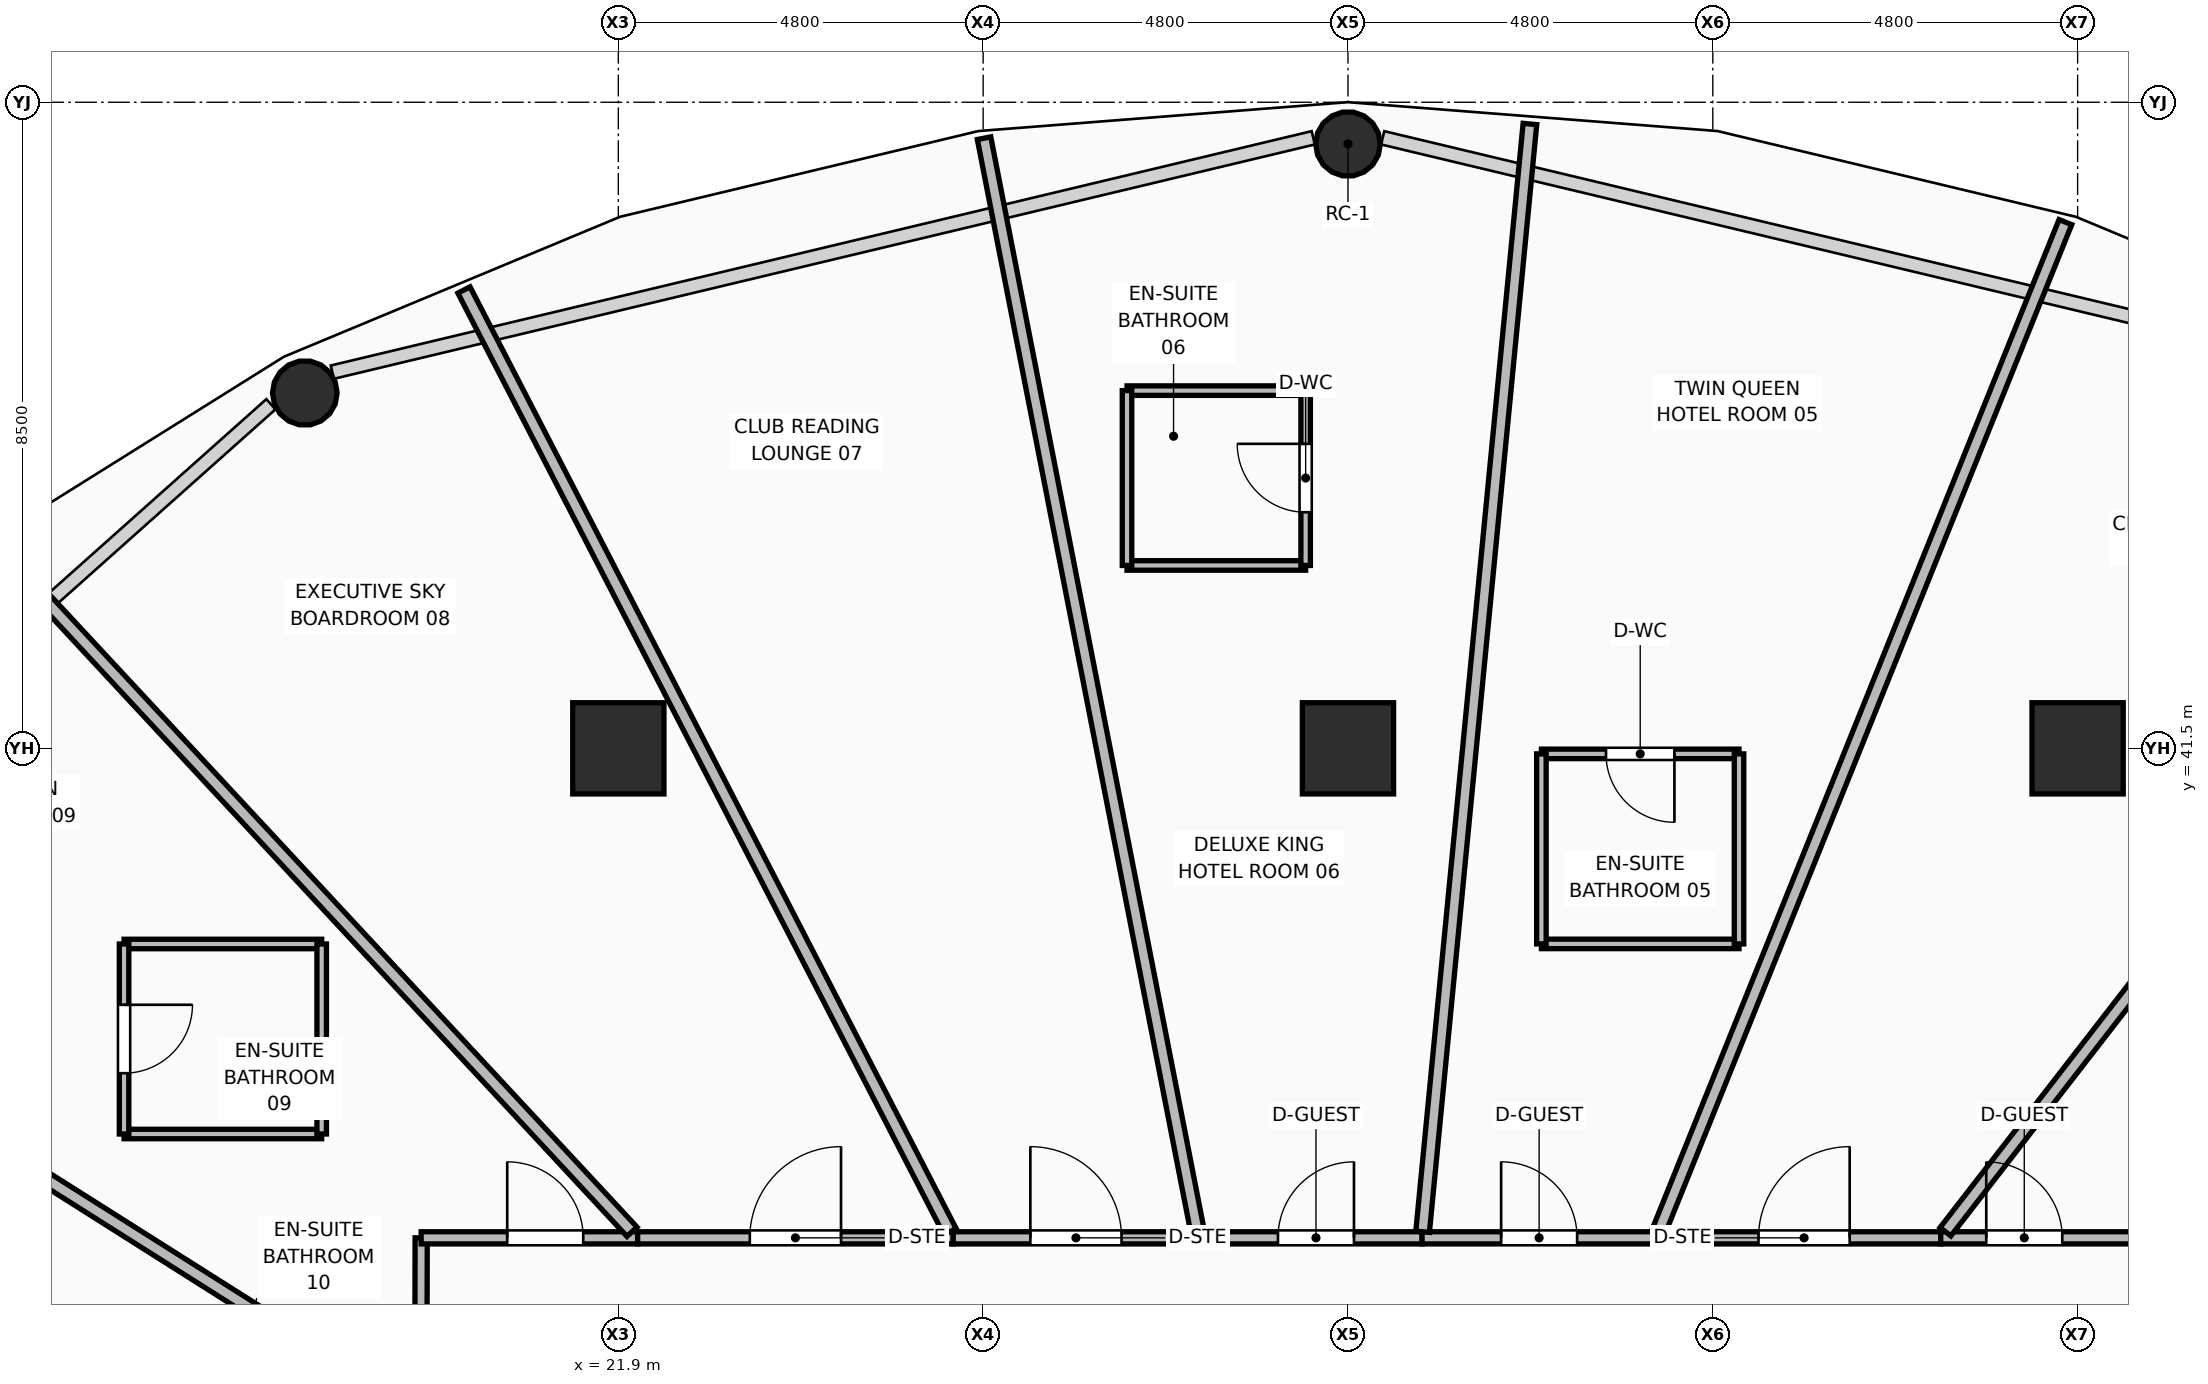
"""IFC4 building model, lengths in metres.
Left out: names, types, materials, properties, quantities, classifications, styles, units other than length and angle.
Written with IfcOpenShell. Run it as: python <this file> out.ifc"""

import sys

from ifc_helpers import new_model, si_unit, direction, frame, frame_2d, origin, origin_2d, place, context, subcontext, project, spatial, rectangle, hollow_rectangle, hollow_circle, extrude, element, fill, save


model = new_model("IFC4")
c1 = context("Model", 3, precision=1e-05, world=origin(), true_north=direction((0.0, 1.0)))
c2 = subcontext(c1, "Body", "Model", "MODEL_VIEW")
j1 = project(units=[si_unit("LENGTHUNIT", "METRE"), si_unit("PLANEANGLEUNIT", "RADIAN")], contexts=[c1])
p1 = place(None, origin())
s1 = spatial("IfcSite", under=j1, at=p1, CompositionType="ELEMENT")
p2 = place(p1, origin())
s2 = spatial("IfcBuilding", under=s1, at=p2, CompositionType="ELEMENT")
p3 = place(p2, frame((0.0, 0.0, 64.5)))
s3 = spatial("IfcBuildingStorey", under=s2, at=p3, CompositionType="ELEMENT", Elevation=64.5)
for number, where, z_axis, x_axis in (
    (1, (21.9, 41.5, 0.0), (0.0, 0.0, 1.0), (1.0, 0.0, 0.0)),
    (2, (31.5, 41.5, 0.0), (0.0, 0.0, 1.0), (1.0, 0.0, 0.0)),
    (3, (41.1, 41.5, 0.0), (0.0, 0.0, 1.0), (1.0, 0.0, 0.0)),
):
    element("IfcColumn", number, at=place(p3, frame(where, z_axis=z_axis, x_axis=x_axis)), inside=s3, PredefinedType="COLUMN", context=c2, shape_type="SweptSolid", body=[
        extrude(hollow_rectangle(XDim=1.2, YDim=1.2, WallThickness=0.045, at=origin_2d()), origin(), (0.0, 0.0, 1.0), 3.75),
    ])
p4 = place(p3, frame((31.5, 49.451, 0.0), z_axis=(0.0, 0.04979113632, 0.998759652141), x_axis=(-1.0, 0.0, 0.0)))
e4 = element("IfcColumn", 4, at=p4, inside=s3, PredefinedType="COLUMN", context=c2, shape_type="SweptSolid", body=[
    extrude(hollow_circle(Radius=0.425, WallThickness=0.04, at=origin_2d()), origin(), (0.0, 0.0, 1.0), 3.574),
])
p5 = place(p3, frame((17.775, 46.175, 0.0), z_axis=(-0.027932729625, 0.043094260131, 0.998680453078), x_axis=(-0.839141746313, -0.543912795946, 0.0)))
e5 = element("IfcColumn", 5, at=p5, inside=s3, PredefinedType="COLUMN", context=c2, shape_type="SweptSolid", body=[
    extrude(hollow_circle(Radius=0.425, WallThickness=0.04, at=origin_2d()), origin(), (0.0, 0.0, 1.0), 3.575),
])
p6 = place(p3, frame((19.301, 32.715, 0.0), z_axis=(0.0, 0.0, 1.0), x_axis=(0.002082244315, 0.999997832127, 0.0)))
e6 = element("IfcWall", 6, at=p6, inside=s3, PredefinedType="PARTITIONING", context=c2, shape_type="SweptSolid", body=[
    extrude(rectangle(XDim=2.345, YDim=0.16, at=frame_2d((1.172, 0.0))), origin(), (0.0, 0.0, 1.0), 2.928),
])
p7 = place(p3, frame((19.306, 35.06, 0.0), z_axis=(0.0, 0.0, 1.0), x_axis=(1.0, 0.0, 0.0)))
e7 = element("IfcWall", 7, at=p7, inside=s3, PredefinedType="PARTITIONING", context=c2, shape_type="SweptSolid", body=[
    extrude(rectangle(XDim=2.848, YDim=0.16, at=frame_2d((1.424, 0.0))), origin(), (0.0, 0.0, 1.0), 2.928),
])
p8 = place(p7, frame((1.132, 0.0, 0.0)))
e8 = element("IfcOpeningElement", 8, at=p8, cuts=e7, PredefinedType="OPENING", context=c2, shape_type="SweptSolid", body=[
    extrude(rectangle(XDim=1.0, YDim=2.1, at=frame_2d((0.5, 1.05))), frame((0.0, 0.09, 0.0), z_axis=(0.0, -1.0, 0.0), x_axis=(1.0, 0.0, 0.0)), (0.0, 0.0, 1.0), 0.18),
])
p9 = place(p3, frame((22.154, 35.06, 0.0), z_axis=(0.0, 0.0, 1.0), x_axis=(1.0, 0.0, 0.0)))
e9 = element("IfcWall", 9, at=p9, inside=s3, PredefinedType="PARTITIONING", context=c2, shape_type="SweptSolid", body=[
    extrude(rectangle(XDim=4.152, YDim=0.16, at=frame_2d((2.076, 0.0))), origin(), (0.0, 0.0, 1.0), 3.55),
])
p10 = place(p9, frame((1.476, 0.0, 0.0)))
e10 = element("IfcOpeningElement", 10, at=p10, cuts=e9, PredefinedType="OPENING", context=c2, shape_type="SweptSolid", body=[
    extrude(rectangle(XDim=1.2, YDim=2.1, at=frame_2d((0.6, 1.05))), frame((0.0, 0.09, 0.0), z_axis=(0.0, -1.0, 0.0), x_axis=(1.0, 0.0, 0.0)), (0.0, 0.0, 1.0), 0.18),
])
p11 = place(p3, frame((26.306, 35.06, 0.0), z_axis=(0.0, 0.0, 1.0), x_axis=(1.0, 0.0, 0.0)))
e11 = element("IfcWall", 11, at=p11, inside=s3, PredefinedType="PARTITIONING", context=c2, shape_type="SweptSolid", body=[
    extrude(rectangle(XDim=3.23, YDim=0.16, at=frame_2d((1.615, 0.0))), origin(), (0.0, 0.0, 1.0), 3.55),
])
p12 = place(p11, frame((1.015, 0.0, 0.0)))
e12 = element("IfcOpeningElement", 12, at=p12, cuts=e11, PredefinedType="OPENING", context=c2, shape_type="SweptSolid", body=[
    extrude(rectangle(XDim=1.2, YDim=2.1, at=frame_2d((0.6, 1.05))), frame((0.0, 0.09, 0.0), z_axis=(0.0, -1.0, 0.0), x_axis=(1.0, 0.0, 0.0)), (0.0, 0.0, 1.0), 0.18),
])
p13 = place(p3, frame((29.536, 35.06, 0.0), z_axis=(0.0, 0.0, 1.0), x_axis=(1.0, 0.0, 0.0)))
e13 = element("IfcWall", 13, at=p13, inside=s3, PredefinedType="PARTITIONING", context=c2, shape_type="SweptSolid", body=[
    extrude(rectangle(XDim=2.939, YDim=0.16, at=frame_2d((1.47, 0.0))), origin(), (0.0, 0.0, 1.0), 2.928),
])
p14 = place(p13, frame((1.043, 0.0, 0.0)))
e14 = element("IfcOpeningElement", 14, at=p14, cuts=e13, PredefinedType="OPENING", context=c2, shape_type="SweptSolid", body=[
    extrude(rectangle(XDim=1.0, YDim=2.1, at=frame_2d((0.5, 1.05))), frame((0.0, 0.09, 0.0), z_axis=(0.0, -1.0, 0.0), x_axis=(1.0, 0.0, 0.0)), (0.0, 0.0, 1.0), 0.18),
])
p15 = place(p3, frame((32.475, 35.06, 0.0), z_axis=(0.0, 0.0, 1.0), x_axis=(1.0, 0.0, 0.0)))
e15 = element("IfcWall", 15, at=p15, inside=s3, PredefinedType="PARTITIONING", context=c2, shape_type="SweptSolid", body=[
    extrude(rectangle(XDim=3.079, YDim=0.16, at=frame_2d((1.54, 0.0))), origin(), (0.0, 0.0, 1.0), 3.55),
])
p16 = place(p15, frame((1.04, 0.0, 0.0)))
e16 = element("IfcOpeningElement", 16, at=p16, cuts=e15, PredefinedType="OPENING", context=c2, shape_type="SweptSolid", body=[
    extrude(rectangle(XDim=1.0, YDim=2.1, at=frame_2d((0.5, 1.05))), frame((0.0, 0.09, 0.0), z_axis=(0.0, -1.0, 0.0), x_axis=(1.0, 0.0, 0.0)), (0.0, 0.0, 1.0), 0.18),
])
p17 = place(p3, frame((35.554, 35.06, 0.0), z_axis=(0.0, 0.0, 1.0), x_axis=(1.0, 0.0, 0.0)))
e17 = element("IfcWall", 17, at=p17, inside=s3, PredefinedType="PARTITIONING", context=c2, shape_type="SweptSolid", body=[
    extrude(rectangle(XDim=3.745, YDim=0.16, at=frame_2d((1.873, 0.0))), origin(), (0.0, 0.0, 1.0), 3.55),
])
p18 = place(p17, frame((1.347, 0.0, 0.0)))
e18 = element("IfcOpeningElement", 18, at=p18, cuts=e17, PredefinedType="OPENING", context=c2, shape_type="SweptSolid", body=[
    extrude(rectangle(XDim=1.2, YDim=2.1, at=frame_2d((0.6, 1.05))), frame((0.0, 0.09, 0.0), z_axis=(0.0, -1.0, 0.0), x_axis=(1.0, 0.0, 0.0)), (0.0, 0.0, 1.0), 0.18),
])
p19 = place(p3, frame((39.299, 35.06, 0.0), z_axis=(0.0, 0.0, 1.0), x_axis=(1.0, 0.0, 0.0)))
e19 = element("IfcWall", 19, at=p19, inside=s3, PredefinedType="PARTITIONING", context=c2, shape_type="SweptSolid", body=[
    extrude(rectangle(XDim=4.395, YDim=0.16, at=frame_2d((2.198, 0.0))), origin(), (0.0, 0.0, 1.0), 2.888),
])
p20 = place(p19, frame((0.599, 0.0, 0.0)))
e20 = element("IfcOpeningElement", 20, at=p20, cuts=e19, PredefinedType="OPENING", context=c2, shape_type="SweptSolid", body=[
    extrude(rectangle(XDim=1.0, YDim=2.1, at=frame_2d((0.5, 1.05))), frame((0.0, 0.09, 0.0), z_axis=(0.0, -1.0, 0.0), x_axis=(1.0, 0.0, 0.0)), (0.0, 0.0, 1.0), 0.18),
])
p21 = place(p3, frame((39.361, 35.14, 0.0), z_axis=(0.0, 0.0, 1.0), x_axis=(0.612637755807, 0.790363827714, 0.0)))
e21 = element("IfcWall", 21, at=p21, inside=s3, PredefinedType="PARTITIONING", context=c2, shape_type="SweptSolid", body=[
    extrude(rectangle(XDim=12.981, YDim=0.18, at=frame_2d((6.491, 0.0))), origin(), (0.0, 0.0, 1.0), 2.735),
])
p22 = place(p3, frame((35.586, 35.14, 0.0), z_axis=(0.0, 0.0, 1.0), x_axis=(0.373781962033, 0.927516600853, 0.0)))
e22 = element("IfcWall", 22, at=p22, inside=s3, PredefinedType="PARTITIONING", context=c2, shape_type="SweptSolid", body=[
    extrude(rectangle(XDim=14.321, YDim=0.18, at=frame_2d((7.161, 0.0))), origin(), (0.0, 0.0, 1.0), 2.735),
])
p23 = place(p3, frame((32.482, 35.14, 0.0), z_axis=(0.0, 0.0, 1.0), x_axis=(0.096439292658, 0.995338868342, 0.0)))
e23 = element("IfcWall", 23, at=p23, inside=s3, PredefinedType="PARTITIONING", context=c2, shape_type="SweptSolid", body=[
    extrude(rectangle(XDim=14.643, YDim=0.18, at=frame_2d((7.321, 0.0))), origin(), (0.0, 0.0, 1.0), 2.735),
])
p24 = place(p3, frame((29.521, 35.14, 0.0), z_axis=(0.0, 0.0, 1.0), x_axis=(-0.19163010074, 0.981467220283, 0.0)))
e24 = element("IfcWall", 24, at=p24, inside=s3, PredefinedType="PARTITIONING", context=c2, shape_type="SweptSolid", body=[
    extrude(rectangle(XDim=14.659, YDim=0.18, at=frame_2d((7.33, 0.0))), origin(), (0.0, 0.0, 1.0), 2.775),
])
p25 = place(p3, frame((26.265, 35.14, 0.0), z_axis=(0.0, 0.0, 1.0), x_axis=(-0.458704466824, 0.888588888134, 0.0)))
e25 = element("IfcWall", 25, at=p25, inside=s3, PredefinedType="PARTITIONING", context=c2, shape_type="SweptSolid", body=[
    extrude(rectangle(XDim=13.944, YDim=0.18, at=frame_2d((6.972, 0.0))), origin(), (0.0, 0.0, 1.0), 2.775),
])
p26 = place(p3, frame((22.08, 35.14, 0.0), z_axis=(0.0, 0.0, 1.0), x_axis=(-0.680639721347, 0.732618297427, 0.0)))
e26 = element("IfcWall", 26, at=p26, inside=s3, PredefinedType="PARTITIONING", context=c2, shape_type="SweptSolid", body=[
    extrude(rectangle(XDim=12.311, YDim=0.18, at=frame_2d((6.155, 0.0))), origin(), (0.0, 0.0, 1.0), 2.775),
])
p27 = place(p3, frame((19.21, 32.773, 0.0), z_axis=(0.0, 0.0, 1.0), x_axis=(-0.845148426003, 0.534531699738, 0.0)))
e27 = element("IfcWall", 27, at=p27, inside=s3, PredefinedType="PARTITIONING", context=c2, shape_type="SweptSolid", body=[
    extrude(rectangle(XDim=12.291, YDim=0.18, at=frame_2d((6.146, 0.0))), origin(), (0.0, 0.0, 1.0), 2.775),
])
p28 = place(p3, frame((34.045, 38.927, 0.0), z_axis=(0.0, 0.0, 1.0), x_axis=(1.0, 0.0, 0.0)))
e28 = element("IfcWall", 28, at=p28, inside=s3, PredefinedType="PARTITIONING", context=c2, shape_type="SweptSolid", body=[
    extrude(rectangle(XDim=2.6, YDim=0.125, at=frame_2d((1.3, 0.0))), origin(), (0.0, 0.0, 1.0), 3.55),
])
p29 = place(p3, frame((34.045, 41.427, 0.0), z_axis=(0.0, 0.0, 1.0), x_axis=(1.0, 0.0, 0.0)))
e29 = element("IfcWall", 29, at=p29, inside=s3, PredefinedType="PARTITIONING", context=c2, shape_type="SweptSolid", body=[
    extrude(rectangle(XDim=2.6, YDim=0.125, at=frame_2d((1.3, 0.0))), origin(), (0.0, 0.0, 1.0), 3.55),
])
p30 = place(p29, frame((0.85, 0.0, 0.0)))
e30 = element("IfcOpeningElement", 30, at=p30, cuts=e29, PredefinedType="OPENING", context=c2, shape_type="SweptSolid", body=[
    extrude(rectangle(XDim=0.9, YDim=2.1, at=frame_2d((0.45, 1.05))), frame((0.0, 0.073, 0.0), z_axis=(0.0, -1.0, 0.0), x_axis=(1.0, 0.0, 0.0)), (0.0, 0.0, 1.0), 0.145),
])
for number, where, z_axis, x_axis in (
    (31, (34.045, 38.927, 0.0), (0.0, 0.0, 1.0), (0.0, 1.0, 0.0)),
    (32, (36.645, 38.927, 0.0), (0.0, 0.0, 1.0), (0.0, 1.0, 0.0)),
):
    element("IfcWall", number, at=place(p3, frame(where, z_axis=z_axis, x_axis=x_axis)), inside=s3, PredefinedType="PARTITIONING", context=c2, shape_type="SweptSolid", body=[
        extrude(rectangle(XDim=2.5, YDim=0.125, at=frame_2d((1.25, 0.0))), origin(), (0.0, 0.0, 1.0), 3.55),
    ])
for number, where, z_axis, x_axis in (
    (33, (28.593, 43.906, 0.0), (0.0, 0.0, 1.0), (1.0, 0.0, 0.0)),
    (34, (28.593, 46.206, 0.0), (0.0, 0.0, 1.0), (1.0, 0.0, 0.0)),
):
    element("IfcWall", number, at=place(p3, frame(where, z_axis=z_axis, x_axis=x_axis)), inside=s3, PredefinedType="PARTITIONING", context=c2, shape_type="SweptSolid", body=[
        extrude(rectangle(XDim=2.35, YDim=0.125, at=frame_2d((1.175, 0.0))), origin(), (0.0, 0.0, 1.0), 3.55),
    ])
p31 = place(p3, frame((28.593, 43.906, 0.0), z_axis=(0.0, 0.0, 1.0), x_axis=(0.0, 1.0, 0.0)))
e35 = element("IfcWall", 35, at=p31, inside=s3, PredefinedType="PARTITIONING", context=c2, shape_type="SweptSolid", body=[
    extrude(rectangle(XDim=2.3, YDim=0.125, at=frame_2d((1.15, 0.0))), origin(), (0.0, 0.0, 1.0), 3.55),
])
p32 = place(p3, frame((30.943, 43.906, 0.0), z_axis=(0.0, 0.0, 1.0), x_axis=(0.0, 1.0, 0.0)))
e36 = element("IfcWall", 36, at=p32, inside=s3, PredefinedType="PARTITIONING", context=c2, shape_type="SweptSolid", body=[
    extrude(rectangle(XDim=2.3, YDim=0.125, at=frame_2d((1.15, 0.0))), origin(), (0.0, 0.0, 1.0), 3.55),
])
p33 = place(p32, frame((0.7, 0.0, 0.0)))
e37 = element("IfcOpeningElement", 37, at=p33, cuts=e36, PredefinedType="OPENING", context=c2, shape_type="SweptSolid", body=[
    extrude(rectangle(XDim=0.9, YDim=2.1, at=frame_2d((0.45, 1.05))), frame((0.0, 0.073, 0.0), z_axis=(0.0, -1.0, 0.0), x_axis=(1.0, 0.0, 0.0)), (0.0, 0.0, 1.0), 0.145),
])
for number, where, z_axis, x_axis in (
    (38, (15.397, 36.426, 0.0), (0.0, 0.0, 1.0), (1.0, 0.0, 0.0)),
    (39, (15.397, 38.926, 0.0), (0.0, 0.0, 1.0), (1.0, 0.0, 0.0)),
):
    element("IfcWall", number, at=place(p3, frame(where, z_axis=z_axis, x_axis=x_axis)), inside=s3, PredefinedType="PARTITIONING", context=c2, shape_type="SweptSolid", body=[
        extrude(rectangle(XDim=2.6, YDim=0.125, at=frame_2d((1.3, 0.0))), origin(), (0.0, 0.0, 1.0), 3.55),
    ])
p34 = place(p3, frame((15.397, 36.426, 0.0), z_axis=(0.0, 0.0, 1.0), x_axis=(0.0, 1.0, 0.0)))
e40 = element("IfcWall", 40, at=p34, inside=s3, PredefinedType="PARTITIONING", context=c2, shape_type="SweptSolid", body=[
    extrude(rectangle(XDim=2.5, YDim=0.125, at=frame_2d((1.25, 0.0))), origin(), (0.0, 0.0, 1.0), 3.55),
])
p35 = place(p34, frame((0.8, 0.0, 0.0)))
e41 = element("IfcOpeningElement", 41, at=p35, cuts=e40, PredefinedType="OPENING", context=c2, shape_type="SweptSolid", body=[
    extrude(rectangle(XDim=0.9, YDim=2.1, at=frame_2d((0.45, 1.05))), frame((0.0, 0.073, 0.0), z_axis=(0.0, -1.0, 0.0), x_axis=(1.0, 0.0, 0.0)), (0.0, 0.0, 1.0), 0.145),
])
p36 = place(p3, frame((17.997, 36.426, 0.0), z_axis=(0.0, 0.0, 1.0), x_axis=(0.0, 1.0, 0.0)))
e42 = element("IfcWall", 42, at=p36, inside=s3, PredefinedType="PARTITIONING", context=c2, shape_type="SweptSolid", body=[
    extrude(rectangle(XDim=2.5, YDim=0.125, at=frame_2d((1.25, 0.0))), origin(), (0.0, 0.0, 1.0), 3.55),
])
p37 = place(p20, origin())
e43 = element("IfcDoor", 43, at=p37, inside=s3, OperationType="SINGLE_SWING_LEFT", PredefinedType="DOOR", context=c2, shape_type="SweptSolid", body=[
    extrude(rectangle(XDim=1.0, YDim=2.1, at=frame_2d((0.5, 1.05))), frame((0.0, 0.025, 0.0), z_axis=(0.0, -1.0, 0.0), x_axis=(1.0, 0.0, 0.0)), (0.0, 0.0, 1.0), 0.05),
])
fill(e20, e43)
p38 = place(p18, origin())
e44 = element("IfcDoor", 44, at=p38, inside=s3, OperationType="SINGLE_SWING_RIGHT", PredefinedType="DOOR", context=c2, shape_type="SweptSolid", body=[
    extrude(rectangle(XDim=1.2, YDim=2.1, at=frame_2d((0.6, 1.05))), frame((0.0, 0.025, 0.0), z_axis=(0.0, -1.0, 0.0), x_axis=(1.0, 0.0, 0.0)), (0.0, 0.0, 1.0), 0.05),
])
fill(e18, e44)
p39 = place(p30, frame((0.9, 0.0, 0.0), z_axis=(0.0, 0.0, 1.0), x_axis=(-1.0, 0.0, 0.0)))
e45 = element("IfcDoor", 45, at=p39, inside=s3, OperationType="SINGLE_SWING_LEFT", PredefinedType="DOOR", context=c2, shape_type="SweptSolid", body=[
    extrude(rectangle(XDim=0.9, YDim=2.1, at=frame_2d((0.45, 1.05))), frame((0.0, 0.025, 0.0), z_axis=(0.0, -1.0, 0.0), x_axis=(1.0, 0.0, 0.0)), (0.0, 0.0, 1.0), 0.05),
])
fill(e30, e45)
p40 = place(p16, origin())
e46 = element("IfcDoor", 46, at=p40, inside=s3, OperationType="SINGLE_SWING_LEFT", PredefinedType="DOOR", context=c2, shape_type="SweptSolid", body=[
    extrude(rectangle(XDim=1.0, YDim=2.1, at=frame_2d((0.5, 1.05))), frame((0.0, 0.025, 0.0), z_axis=(0.0, -1.0, 0.0), x_axis=(1.0, 0.0, 0.0)), (0.0, 0.0, 1.0), 0.05),
])
fill(e16, e46)
p41 = place(p33, origin())
e47 = element("IfcDoor", 47, at=p41, inside=s3, OperationType="SINGLE_SWING_RIGHT", PredefinedType="DOOR", context=c2, shape_type="SweptSolid", body=[
    extrude(rectangle(XDim=0.9, YDim=2.1, at=frame_2d((0.45, 1.05))), frame((0.0, 0.025, 0.0), z_axis=(0.0, -1.0, 0.0), x_axis=(1.0, 0.0, 0.0)), (0.0, 0.0, 1.0), 0.05),
])
fill(e37, e47)
p42 = place(p14, origin())
e48 = element("IfcDoor", 48, at=p42, inside=s3, OperationType="SINGLE_SWING_RIGHT", PredefinedType="DOOR", context=c2, shape_type="SweptSolid", body=[
    extrude(rectangle(XDim=1.0, YDim=2.1, at=frame_2d((0.5, 1.05))), frame((0.0, 0.025, 0.0), z_axis=(0.0, -1.0, 0.0), x_axis=(1.0, 0.0, 0.0)), (0.0, 0.0, 1.0), 0.05),
])
fill(e14, e48)
p43 = place(p12, origin())
e49 = element("IfcDoor", 49, at=p43, inside=s3, OperationType="SINGLE_SWING_LEFT", PredefinedType="DOOR", context=c2, shape_type="SweptSolid", body=[
    extrude(rectangle(XDim=1.2, YDim=2.1, at=frame_2d((0.6, 1.05))), frame((0.0, 0.025, 0.0), z_axis=(0.0, -1.0, 0.0), x_axis=(1.0, 0.0, 0.0)), (0.0, 0.0, 1.0), 0.05),
])
fill(e12, e49)
p44 = place(p10, origin())
e50 = element("IfcDoor", 50, at=p44, inside=s3, OperationType="SINGLE_SWING_RIGHT", PredefinedType="DOOR", context=c2, shape_type="SweptSolid", body=[
    extrude(rectangle(XDim=1.2, YDim=2.1, at=frame_2d((0.6, 1.05))), frame((0.0, 0.025, 0.0), z_axis=(0.0, -1.0, 0.0), x_axis=(1.0, 0.0, 0.0)), (0.0, 0.0, 1.0), 0.05),
])
fill(e10, e50)
p45 = place(p35, frame((0.9, 0.0, 0.0), z_axis=(0.0, 0.0, 1.0), x_axis=(-1.0, 0.0, 0.0)))
e51 = element("IfcDoor", 51, at=p45, inside=s3, OperationType="SINGLE_SWING_LEFT", PredefinedType="DOOR", context=c2, shape_type="SweptSolid", body=[
    extrude(rectangle(XDim=0.9, YDim=2.1, at=frame_2d((0.45, 1.05))), frame((0.0, 0.025, 0.0), z_axis=(0.0, -1.0, 0.0), x_axis=(1.0, 0.0, 0.0)), (0.0, 0.0, 1.0), 0.05),
])
fill(e41, e51)
p46 = place(p8, origin())
e52 = element("IfcDoor", 52, at=p46, inside=s3, OperationType="SINGLE_SWING_LEFT", PredefinedType="DOOR", context=c2, shape_type="SweptSolid", body=[
    extrude(rectangle(XDim=1.0, YDim=2.1, at=frame_2d((0.5, 1.05))), frame((0.0, 0.025, 0.0), z_axis=(0.0, -1.0, 0.0), x_axis=(1.0, 0.0, 0.0)), (0.0, 0.0, 1.0), 0.05),
])
fill(e8, e52)
save(model, sys.argv[1])
